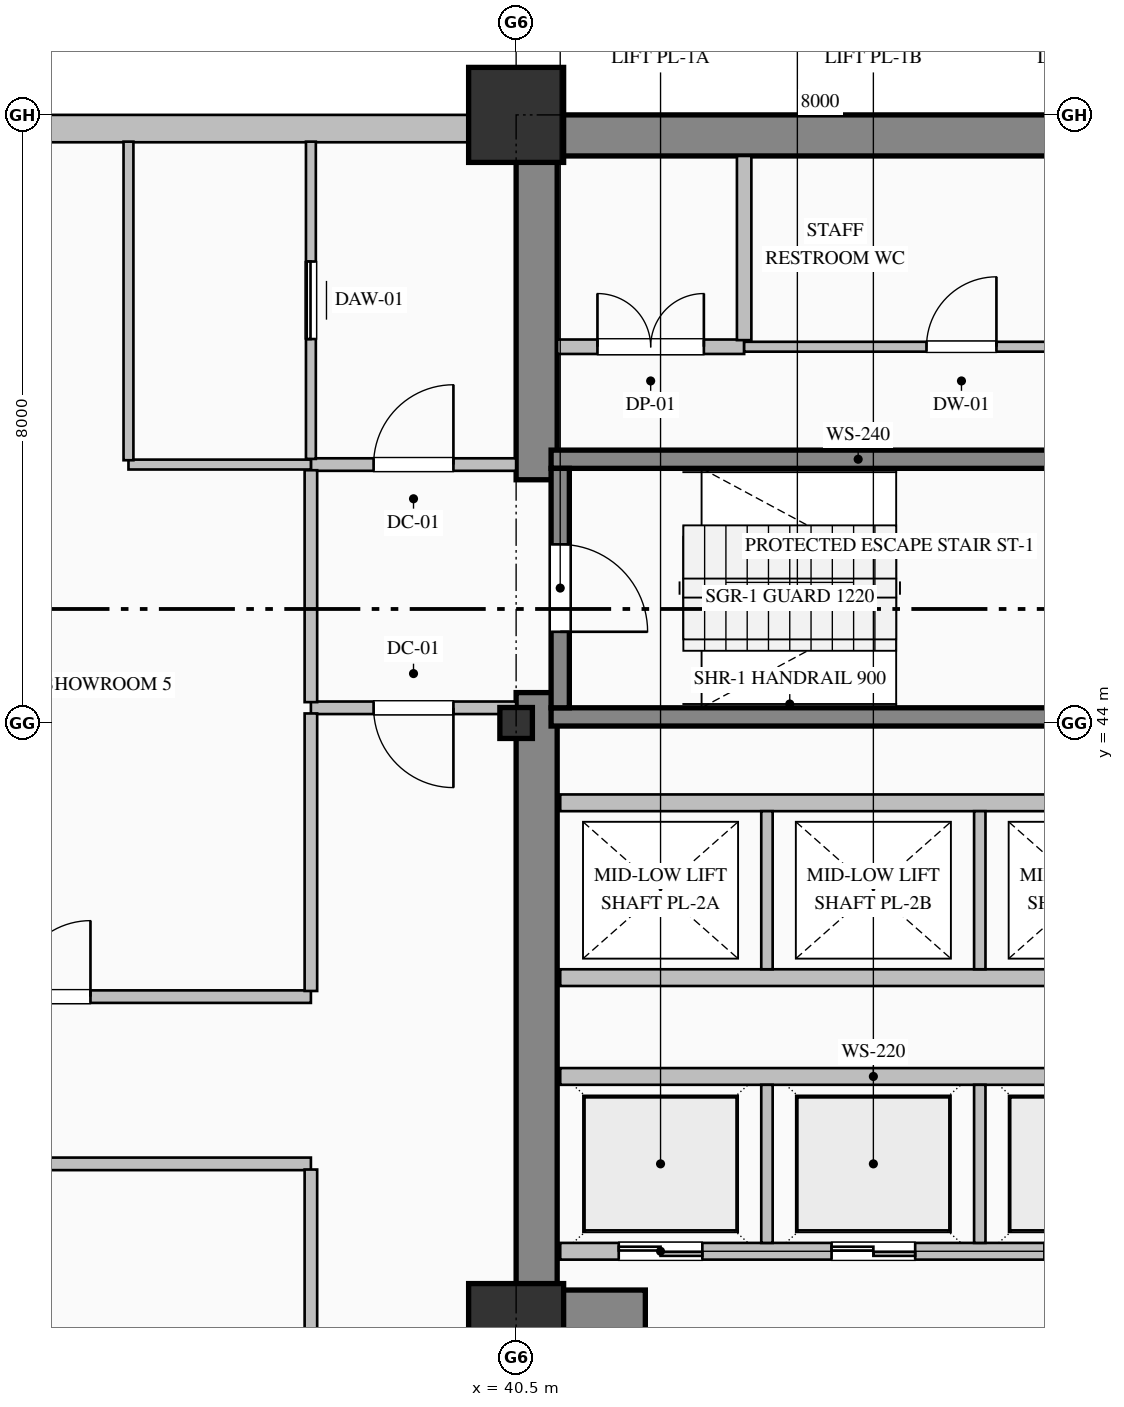
"""IFC4 building model, lengths in metres.
Left out: names, types, materials, properties, quantities, classifications, styles, units other than length and angle.
Written with IfcOpenShell. Run it as: python <this file> out.ifc"""

import sys

from ifc_helpers import new_model, si_unit, direction, frame, frame_2d, origin, origin_2d, place, context, subcontext, project, spatial, rectangle, hollow_rectangle, i_section, extrude, element, fill, save


model = new_model("IFC4")
c1 = context("Model", 3, precision=1e-05, world=origin(), true_north=direction((0.0, 1.0)))
c2 = subcontext(c1, "Body", "Model", "MODEL_VIEW")
j1 = project(units=[si_unit("LENGTHUNIT", "METRE"), si_unit("PLANEANGLEUNIT", "RADIAN")], contexts=[c1])
p1 = place(None, origin())
s1 = spatial("IfcSite", under=j1, at=p1, CompositionType="ELEMENT")
p2 = place(p1, origin())
s2 = spatial("IfcBuilding", under=s1, at=p2, CompositionType="ELEMENT")
p3 = place(p2, frame((0.0, 0.0, 96.2)))
s3 = spatial("IfcBuildingStorey", under=s2, at=p3, CompositionType="ELEMENT", Elevation=96.2)
p4 = place(p3, frame((40.5, 51.73, 0.0), z_axis=(0.0, 0.0, 1.0), x_axis=(1.0, 0.0, 0.0)))
e1 = element("IfcWall", 1, at=p4, inside=s3, PredefinedType="SHEAR", context=c2, shape_type="SweptSolid", body=[
    extrude(rectangle(XDim=23.5, YDim=0.54, at=frame_2d((11.75, 0.0))), origin(), (0.0, 0.0, 1.0), 3.75),
])
p5 = place(p3, frame((40.77, 36.54, 0.0), z_axis=(0.0, 0.0, 1.0), x_axis=(0.0, 1.0, 0.0)))
e2 = element("IfcWall", 2, at=p5, inside=s3, PredefinedType="SHEAR", context=c2, shape_type="SweptSolid", body=[
    extrude(rectangle(XDim=7.86, YDim=0.54, at=frame_2d((3.93, 0.0))), origin(), (0.0, 0.0, 1.0), 3.75),
])
p6 = place(p3, frame((40.77, 47.2, 0.0), z_axis=(0.0, 0.0, 1.0), x_axis=(0.0, 1.0, 0.0)))
e3 = element("IfcWall", 3, at=p6, inside=s3, PredefinedType="SHEAR", context=c2, shape_type="SweptSolid", body=[
    extrude(rectangle(XDim=4.26, YDim=0.54, at=frame_2d((2.13, 0.0))), origin(), (0.0, 0.0, 1.0), 3.75),
])
p7 = place(p3, frame((40.5, 36.27, 0.0), z_axis=(0.0, 0.0, 1.0), x_axis=(1.0, 0.0, 0.0)))
e4 = element("IfcWall", 4, at=p7, inside=s3, PredefinedType="SHEAR", context=c2, shape_type="SweptSolid", body=[
    extrude(rectangle(XDim=1.7, YDim=0.54, at=frame_2d((0.85, 0.0))), origin(), (0.0, 0.0, 1.0), 3.75),
])
p8 = place(p3, frame((40.5, 36.0, 0.0), z_axis=(0.0, 0.0, 1.0), x_axis=(1.0, 0.0, 0.0)))
e5 = element("IfcColumn", 5, at=p8, inside=s3, PredefinedType="COLUMN", context=c2, shape_type="SweptSolid", body=[
    extrude(hollow_rectangle(XDim=1.25, YDim=1.25, WallThickness=0.045, at=origin_2d()), origin(), (0.0, 0.0, 1.0), 4.0),
])
p9 = place(p3, frame((40.5, 44.0, 0.0), z_axis=(0.0, 0.0, 1.0), x_axis=(1.0, 0.0, 0.0)))
e6 = element("IfcColumn", 6, at=p9, inside=s3, PredefinedType="COLUMN", context=c2, shape_type="SweptSolid", body=[
    extrude(i_section(OverallWidth=0.407, OverallDepth=0.428, WebThickness=0.02, FlangeThickness=0.035, FilletRadius=0.022, at=origin_2d()), origin(), (0.0, 0.0, 1.0), 4.0),
])
p10 = place(p3, frame((40.5, 52.0, 0.0), z_axis=(0.0, 0.0, 1.0), x_axis=(1.0, 0.0, 0.0)))
e7 = element("IfcColumn", 7, at=p10, inside=s3, PredefinedType="COLUMN", context=c2, shape_type="SweptSolid", body=[
    extrude(hollow_rectangle(XDim=1.25, YDim=1.25, WallThickness=0.045, at=origin_2d()), origin(), (0.0, 0.0, 1.0), 4.0),
])
p11 = place(p3, frame((4.0, 51.82, 0.0), z_axis=(0.0, 0.0, 1.0), x_axis=(1.0, 0.0, 0.0)))
e8 = element("IfcWall", 8, at=p11, inside=s3, PredefinedType="SOLIDWALL", context=c2, shape_type="SweptSolid", body=[
    extrude(rectangle(XDim=36.52, YDim=0.36, at=frame_2d((18.26, 0.0))), origin(), (0.0, 0.0, 1.0), 3.25),
])
p12 = place(p11, frame((16.8, 0.0, 0.8)))
e9 = element("IfcOpeningElement", 9, at=p12, cuts=e8, PredefinedType="OPENING", context=c2, shape_type="SweptSolid", body=[
    extrude(rectangle(XDim=2.4, YDim=2.15, at=frame_2d((1.2, 1.075))), frame((0.0, 0.19, 0.0), z_axis=(0.0, -1.0, 0.0), x_axis=(1.0, 0.0, 0.0)), (0.0, 0.0, 1.0), 0.38),
])
p13 = place(p11, frame((24.15, 0.0, 0.85)))
e10 = element("IfcOpeningElement", 10, at=p13, cuts=e8, PredefinedType="OPENING", context=c2, shape_type="SweptSolid", body=[
    extrude(rectangle(XDim=2.1, YDim=2.05, at=frame_2d((1.05, 1.025))), frame((0.0, 0.19, 0.0), z_axis=(0.0, -1.0, 0.0), x_axis=(1.0, 0.0, 0.0)), (0.0, 0.0, 1.0), 0.38),
])
for number, where, z_axis, x_axis in (
    (11, (40.96, 47.47, 0.0), (0.0, 0.0, 1.0), (1.0, 0.0, 0.0)),
    (12, (49.04, 44.08, 0.0), (0.0, 0.0, 1.0), (-1.0, 0.0, 0.0)),
):
    element("IfcWall", number, at=place(p3, frame(where, z_axis=z_axis, x_axis=x_axis)), inside=s3, PredefinedType="SOLIDWALL", context=c2, shape_type="SweptSolid", body=[
        extrude(rectangle(XDim=8.08, YDim=0.24, at=frame_2d((4.04, 0.0))), origin(), (0.0, 0.0, 1.0), 4.0),
    ])
p14 = place(p3, frame((41.08, 47.35, 0.0), z_axis=(0.0, 0.0, 1.0), x_axis=(0.0, -1.0, 0.0)))
e13 = element("IfcWall", 13, at=p14, inside=s3, PredefinedType="SOLIDWALL", context=c2, shape_type="SweptSolid", body=[
    extrude(rectangle(XDim=3.15, YDim=0.24, at=frame_2d((1.575, 0.0))), origin(), (0.0, 0.0, 1.0), 4.0),
])
p15 = place(p14, frame((1.0, 0.0, 0.0)))
e14 = element("IfcOpeningElement", 14, at=p15, cuts=e13, PredefinedType="OPENING", context=c2, shape_type="SweptSolid", body=[
    extrude(rectangle(XDim=1.15, YDim=2.2, at=frame_2d((0.575, 1.1))), frame((0.0, 0.13, 0.0), z_axis=(0.0, -1.0, 0.0), x_axis=(1.0, 0.0, 0.0)), (0.0, 0.0, 1.0), 0.26),
])
p16 = place(p3, frame((49.32, 37.05, 0.0), z_axis=(0.0, 0.0, 1.0), x_axis=(-1.0, 0.0, 0.0)))
e15 = element("IfcWall", 15, at=p16, inside=s3, PredefinedType="PARTITIONING", context=c2, shape_type="SweptSolid", body=[
    extrude(rectangle(XDim=8.24, YDim=0.22, at=frame_2d((4.12, 0.0))), origin(), (0.0, 0.0, 1.0), 3.75),
])
p17 = place(p16, frame((6.37, 0.0, 0.0)))
e16 = element("IfcOpeningElement", 16, at=p17, cuts=e15, PredefinedType="OPENING", context=c2, shape_type="SweptSolid", body=[
    extrude(rectangle(XDim=1.1, YDim=2.2, at=frame_2d((0.55, 1.1))), frame((0.0, 0.12, 0.0), z_axis=(0.0, -1.0, 0.0), x_axis=(1.0, 0.0, 0.0)), (0.0, 0.0, 1.0), 0.24),
])
p18 = place(p16, frame((3.57, 0.0, 0.0)))
e17 = element("IfcOpeningElement", 17, at=p18, cuts=e15, PredefinedType="OPENING", context=c2, shape_type="SweptSolid", body=[
    extrude(rectangle(XDim=1.1, YDim=2.2, at=frame_2d((0.55, 1.1))), frame((0.0, 0.12, 0.0), z_axis=(0.0, -1.0, 0.0), x_axis=(1.0, 0.0, 0.0)), (0.0, 0.0, 1.0), 0.24),
])
p19 = place(p16, frame((0.77, 0.0, 0.0)))
e18 = element("IfcOpeningElement", 18, at=p19, cuts=e15, PredefinedType="OPENING", context=c2, shape_type="SweptSolid", body=[
    extrude(rectangle(XDim=1.1, YDim=2.2, at=frame_2d((0.55, 1.1))), frame((0.0, 0.12, 0.0), z_axis=(0.0, -1.0, 0.0), x_axis=(1.0, 0.0, 0.0)), (0.0, 0.0, 1.0), 0.24),
])
p20 = place(p3, frame((41.08, 39.35, 0.0), z_axis=(0.0, 0.0, 1.0), x_axis=(1.0, 0.0, 0.0)))
e19 = element("IfcWall", 19, at=p20, inside=s3, PredefinedType="PARTITIONING", context=c2, shape_type="SweptSolid", body=[
    extrude(rectangle(XDim=8.24, YDim=0.22, at=frame_2d((4.12, 0.0))), origin(), (0.0, 0.0, 1.0), 3.75),
])
for number, where, z_axis, x_axis in (
    (20, (43.8, 37.16, 0.0), (0.0, 0.0, 1.0), (0.0, 1.0, 0.0)),
    (21, (46.6, 37.16, 0.0), (0.0, 0.0, 1.0), (0.0, 1.0, 0.0)),
):
    element("IfcWall", number, at=place(p3, frame(where, z_axis=z_axis, x_axis=x_axis)), inside=s3, PredefinedType="PARTITIONING", context=c2, shape_type="SweptSolid", body=[
        extrude(rectangle(XDim=2.08, YDim=0.15, at=frame_2d((1.04, 0.0))), origin(), (0.0, 0.0, 1.0), 3.75),
    ])
for number, where, z_axis, x_axis in (
    (22, (49.32, 40.65, 0.0), (0.0, 0.0, 1.0), (-1.0, 0.0, 0.0)),
    (23, (41.08, 42.95, 0.0), (0.0, 0.0, 1.0), (1.0, 0.0, 0.0)),
):
    element("IfcWall", number, at=place(p3, frame(where, z_axis=z_axis, x_axis=x_axis)), inside=s3, PredefinedType="PARTITIONING", context=c2, shape_type="SweptSolid", body=[
        extrude(rectangle(XDim=8.24, YDim=0.22, at=frame_2d((4.12, 0.0))), origin(), (0.0, 0.0, 1.0), 3.75),
    ])
for number, where, z_axis, x_axis in (
    (24, (43.8, 40.76, 0.0), (0.0, 0.0, 1.0), (0.0, 1.0, 0.0)),
    (25, (46.6, 40.76, 0.0), (0.0, 0.0, 1.0), (0.0, 1.0, 0.0)),
):
    element("IfcWall", number, at=place(p3, frame(where, z_axis=z_axis, x_axis=x_axis)), inside=s3, PredefinedType="PARTITIONING", context=c2, shape_type="SweptSolid", body=[
        extrude(rectangle(XDim=2.08, YDim=0.15, at=frame_2d((1.04, 0.0))), origin(), (0.0, 0.0, 1.0), 3.75),
    ])
p21 = place(p3, frame((37.8, 47.4, 0.0), z_axis=(0.0, 0.0, 1.0), x_axis=(1.0, 0.0, 0.0)))
e26 = element("IfcWall", 26, at=p21, inside=s3, PredefinedType="PARTITIONING", context=c2, shape_type="SweptSolid", body=[
    extrude(rectangle(XDim=2.7, YDim=0.165, at=frame_2d((1.35, 0.0))), origin(), (0.0, 0.0, 1.0), 3.75),
])
p22 = place(p21, frame((0.825, 0.0, 0.0)))
e27 = element("IfcOpeningElement", 27, at=p22, cuts=e26, PredefinedType="OPENING", context=c2, shape_type="SweptSolid", body=[
    extrude(rectangle(XDim=1.05, YDim=2.15, at=frame_2d((0.525, 1.075))), frame((0.0, 0.093, 0.0), z_axis=(0.0, -1.0, 0.0), x_axis=(1.0, 0.0, 0.0)), (0.0, 0.0, 1.0), 0.185),
])
p23 = place(p3, frame((40.5, 44.2, 0.0), z_axis=(0.0, 0.0, 1.0), x_axis=(-1.0, 0.0, 0.0)))
e28 = element("IfcWall", 28, at=p23, inside=s3, PredefinedType="PARTITIONING", context=c2, shape_type="SweptSolid", body=[
    extrude(rectangle(XDim=2.7, YDim=0.165, at=frame_2d((1.35, 0.0))), origin(), (0.0, 0.0, 1.0), 3.75),
])
p24 = place(p23, frame((0.825, 0.0, 0.0)))
e29 = element("IfcOpeningElement", 29, at=p24, cuts=e28, PredefinedType="OPENING", context=c2, shape_type="SweptSolid", body=[
    extrude(rectangle(XDim=1.05, YDim=2.15, at=frame_2d((0.525, 1.075))), frame((0.0, 0.093, 0.0), z_axis=(0.0, -1.0, 0.0), x_axis=(1.0, 0.0, 0.0)), (0.0, 0.0, 1.0), 0.185),
])
p25 = place(p3, frame((37.8, 44.274, 0.0), z_axis=(0.0, 0.0, 1.0), x_axis=(0.0, 1.0, 0.0)))
e30 = element("IfcWall", 30, at=p25, inside=s3, PredefinedType="PARTITIONING", context=c2, shape_type="SweptSolid", body=[
    extrude(rectangle(XDim=3.051, YDim=0.165, at=frame_2d((1.525, 0.0))), origin(), (0.0, 0.0, 1.0), 3.75),
])
p26 = place(p3, frame((37.8, 47.475, 0.0), z_axis=(0.0, 0.0, 1.0), x_axis=(0.0, 1.0, 0.0)))
e31 = element("IfcWall", 31, at=p26, inside=s3, PredefinedType="PARTITIONING", context=c2, shape_type="SweptSolid", body=[
    extrude(rectangle(XDim=4.173, YDim=0.13, at=frame_2d((2.087, 0.0))), origin(), (0.0, 0.0, 1.0), 3.75),
])
p27 = place(p26, frame((1.577, 0.0, 0.0)))
e32 = element("IfcOpeningElement", 32, at=p27, cuts=e31, PredefinedType="OPENING", context=c2, shape_type="SweptSolid", body=[
    extrude(rectangle(XDim=1.02, YDim=2.15, at=frame_2d((0.51, 1.075))), frame((0.0, 0.075, 0.0), z_axis=(0.0, -1.0, 0.0), x_axis=(1.0, 0.0, 0.0)), (0.0, 0.0, 1.0), 0.15),
])
p28 = place(p3, frame((37.8, 47.4, 0.0), z_axis=(0.0, 0.0, 1.0), x_axis=(-1.0, 0.0, 0.0)))
e33 = element("IfcWall", 33, at=p28, inside=s3, PredefinedType="PARTITIONING", context=c2, shape_type="SweptSolid", body=[
    extrude(rectangle(XDim=2.4, YDim=0.13, at=frame_2d((1.2, 0.0))), origin(), (0.0, 0.0, 1.0), 3.75),
])
p29 = place(p3, frame((35.4, 47.457, 0.0), z_axis=(0.0, 0.0, 1.0), x_axis=(0.0, 1.0, 0.0)))
e34 = element("IfcWall", 34, at=p29, inside=s3, PredefinedType="PARTITIONING", context=c2, shape_type="SweptSolid", body=[
    extrude(rectangle(XDim=4.191, YDim=0.13, at=frame_2d((2.095, 0.0))), origin(), (0.0, 0.0, 1.0), 3.75),
])
p30 = place(p3, frame((41.04, 48.95, 0.0), z_axis=(0.0, 0.0, 1.0), x_axis=(1.0, 0.0, 0.0)))
e35 = element("IfcWall", 35, at=p30, inside=s3, PredefinedType="PARTITIONING", context=c2, shape_type="SweptSolid", body=[
    extrude(rectangle(XDim=2.46, YDim=0.19, at=frame_2d((1.23, 0.0))), origin(), (0.0, 0.0, 1.0), 3.75),
])
p31 = place(p30, frame((0.53, 0.0, 0.0)))
e36 = element("IfcOpeningElement", 36, at=p31, cuts=e35, PredefinedType="OPENING", context=c2, shape_type="SweptSolid", body=[
    extrude(rectangle(XDim=1.4, YDim=2.25, at=frame_2d((0.7, 1.125))), frame((0.0, 0.105, 0.0), z_axis=(0.0, -1.0, 0.0), x_axis=(1.0, 0.0, 0.0)), (0.0, 0.0, 1.0), 0.21),
])
p32 = place(p3, frame((43.5, 48.95, 0.0), z_axis=(0.0, 0.0, 1.0), x_axis=(1.0, 0.0, 0.0)))
e37 = element("IfcWall", 37, at=p32, inside=s3, PredefinedType="PARTITIONING", context=c2, shape_type="SweptSolid", body=[
    extrude(rectangle(XDim=5.718, YDim=0.13, at=frame_2d((2.859, 0.0))), origin(), (0.0, 0.0, 1.0), 3.75),
])
p33 = place(p32, frame((2.399, 0.0, 0.0)))
e38 = element("IfcOpeningElement", 38, at=p33, cuts=e37, PredefinedType="OPENING", context=c2, shape_type="SweptSolid", body=[
    extrude(rectangle(XDim=0.92, YDim=2.15, at=frame_2d((0.46, 1.075))), frame((0.0, 0.075, 0.0), z_axis=(0.0, -1.0, 0.0), x_axis=(1.0, 0.0, 0.0)), (0.0, 0.0, 1.0), 0.15),
])
p34 = place(p3, frame((43.5, 51.46, 0.0), z_axis=(0.0, 0.0, 1.0), x_axis=(0.0, -1.0, 0.0)))
e39 = element("IfcWall", 39, at=p34, inside=s3, PredefinedType="PARTITIONING", context=c2, shape_type="SweptSolid", body=[
    extrude(rectangle(XDim=2.423, YDim=0.19, at=frame_2d((1.211, 0.0))), origin(), (0.0, 0.0, 1.0), 3.75),
])
p35 = place(p3, frame((31.0, 40.4, 0.0), z_axis=(0.0, 0.0, 1.0), x_axis=(1.0, 0.0, 0.0)))
e40 = element("IfcWall", 40, at=p35, inside=s3, PredefinedType="PARTITIONING", context=c2, shape_type="SweptSolid", body=[
    extrude(rectangle(XDim=6.8, YDim=0.165, at=frame_2d((3.4, 0.0))), origin(), (0.0, 0.0, 1.0), 3.75),
])
p36 = place(p35, frame((2.9, 0.0, 0.0)))
e41 = element("IfcOpeningElement", 41, at=p36, cuts=e40, PredefinedType="OPENING", context=c2, shape_type="SweptSolid", body=[
    extrude(rectangle(XDim=1.0, YDim=2.15, at=frame_2d((0.5, 1.075))), frame((0.0, 0.093, 0.0), z_axis=(0.0, -1.0, 0.0), x_axis=(1.0, 0.0, 0.0)), (0.0, 0.0, 1.0), 0.185),
])
p37 = place(p3, frame((37.8, 38.2, 0.0), z_axis=(0.0, 0.0, 1.0), x_axis=(-1.0, 0.0, 0.0)))
e42 = element("IfcWall", 42, at=p37, inside=s3, PredefinedType="PARTITIONING", context=c2, shape_type="SweptSolid", body=[
    extrude(rectangle(XDim=4.0, YDim=0.165, at=frame_2d((2.0, 0.0))), origin(), (0.0, 0.0, 1.0), 3.75),
])
p38 = place(p3, frame((37.8, 40.475, 0.0), z_axis=(0.0, 0.0, 1.0), x_axis=(0.0, 1.0, 0.0)))
e43 = element("IfcWall", 43, at=p38, inside=s3, PredefinedType="PARTITIONING", context=c2, shape_type="SweptSolid", body=[
    extrude(rectangle(XDim=3.651, YDim=0.165, at=frame_2d((1.825, 0.0))), origin(), (0.0, 0.0, 1.0), 3.75),
])
p39 = place(p3, frame((37.8, 31.6, 0.0), z_axis=(0.0, 0.0, 1.0), x_axis=(0.0, 1.0, 0.0)))
e44 = element("IfcWall", 44, at=p39, inside=s3, PredefinedType="PARTITIONING", context=c2, shape_type="SweptSolid", body=[
    extrude(rectangle(XDim=6.525, YDim=0.165, at=frame_2d((3.263, 0.0))), origin(), (0.0, 0.0, 1.0), 3.75),
])
p40 = place(p39, frame((2.763, 0.0, 0.0)))
e45 = element("IfcOpeningElement", 45, at=p40, cuts=e44, PredefinedType="OPENING", context=c2, shape_type="SweptSolid", body=[
    extrude(rectangle(XDim=1.0, YDim=2.15, at=frame_2d((0.5, 1.075))), frame((0.0, 0.093, 0.0), z_axis=(0.0, -1.0, 0.0), x_axis=(1.0, 0.0, 0.0)), (0.0, 0.0, 1.0), 0.185),
])
p41 = place(p15, origin())
e46 = element("IfcDoor", 46, at=p41, inside=s3, OperationType="SINGLE_SWING_RIGHT", PredefinedType="DOOR", context=c2, shape_type="SweptSolid", body=[
    extrude(rectangle(XDim=1.15, YDim=2.2, at=frame_2d((0.575, 1.1))), frame((0.0, 0.025, 0.0), z_axis=(0.0, -1.0, 0.0), x_axis=(1.0, 0.0, 0.0)), (0.0, 0.0, 1.0), 0.05),
])
fill(e14, e46)
p42 = place(p17, origin())
e47 = element("IfcDoor", 47, at=p42, inside=s3, OperationType="DOUBLE_DOOR_SLIDING", PredefinedType="DOOR", context=c2, shape_type="SweptSolid", body=[
    extrude(rectangle(XDim=1.1, YDim=2.2, at=frame_2d((0.55, 1.1))), frame((0.0, 0.025, 0.0), z_axis=(0.0, -1.0, 0.0), x_axis=(1.0, 0.0, 0.0)), (0.0, 0.0, 1.0), 0.05),
])
fill(e16, e47)
p43 = place(p18, origin())
e48 = element("IfcDoor", 48, at=p43, inside=s3, OperationType="DOUBLE_DOOR_SLIDING", PredefinedType="DOOR", context=c2, shape_type="SweptSolid", body=[
    extrude(rectangle(XDim=1.1, YDim=2.2, at=frame_2d((0.55, 1.1))), frame((0.0, 0.025, 0.0), z_axis=(0.0, -1.0, 0.0), x_axis=(1.0, 0.0, 0.0)), (0.0, 0.0, 1.0), 0.05),
])
fill(e17, e48)
p44 = place(p22, origin())
e49 = element("IfcDoor", 49, at=p44, inside=s3, OperationType="SINGLE_SWING_RIGHT", PredefinedType="DOOR", context=c2, shape_type="SweptSolid", body=[
    extrude(rectangle(XDim=1.05, YDim=2.15, at=frame_2d((0.525, 1.075))), frame((0.0, 0.025, 0.0), z_axis=(0.0, -1.0, 0.0), x_axis=(1.0, 0.0, 0.0)), (0.0, 0.0, 1.0), 0.05),
])
fill(e27, e49)
p45 = place(p24, origin())
e50 = element("IfcDoor", 50, at=p45, inside=s3, OperationType="SINGLE_SWING_LEFT", PredefinedType="DOOR", context=c2, shape_type="SweptSolid", body=[
    extrude(rectangle(XDim=1.05, YDim=2.15, at=frame_2d((0.525, 1.075))), frame((0.0, 0.025, 0.0), z_axis=(0.0, -1.0, 0.0), x_axis=(1.0, 0.0, 0.0)), (0.0, 0.0, 1.0), 0.05),
])
fill(e29, e50)
p46 = place(p27, origin())
e51 = element("IfcDoor", 51, at=p46, inside=s3, OperationType="SLIDING_TO_LEFT", PredefinedType="DOOR", context=c2, shape_type="SweptSolid", body=[
    extrude(rectangle(XDim=1.02, YDim=2.15, at=frame_2d((0.51, 1.075))), frame((0.0, 0.025, 0.0), z_axis=(0.0, -1.0, 0.0), x_axis=(1.0, 0.0, 0.0)), (0.0, 0.0, 1.0), 0.05),
])
fill(e32, e51)
p47 = place(p31, origin())
e52 = element("IfcDoor", 52, at=p47, inside=s3, OperationType="DOUBLE_DOOR_SINGLE_SWING", PredefinedType="DOOR", context=c2, shape_type="SweptSolid", body=[
    extrude(rectangle(XDim=1.4, YDim=2.25, at=frame_2d((0.7, 1.125))), frame((0.0, 0.025, 0.0), z_axis=(0.0, -1.0, 0.0), x_axis=(1.0, 0.0, 0.0)), (0.0, 0.0, 1.0), 0.05),
])
fill(e36, e52)
p48 = place(p33, origin())
e53 = element("IfcDoor", 53, at=p48, inside=s3, OperationType="SINGLE_SWING_RIGHT", PredefinedType="DOOR", context=c2, shape_type="SweptSolid", body=[
    extrude(rectangle(XDim=0.92, YDim=2.15, at=frame_2d((0.46, 1.075))), frame((0.0, 0.025, 0.0), z_axis=(0.0, -1.0, 0.0), x_axis=(1.0, 0.0, 0.0)), (0.0, 0.0, 1.0), 0.05),
])
fill(e38, e53)
p49 = place(p36, origin())
e54 = element("IfcDoor", 54, at=p49, inside=s3, OperationType="SINGLE_SWING_RIGHT", PredefinedType="DOOR", context=c2, shape_type="SweptSolid", body=[
    extrude(rectangle(XDim=1.0, YDim=2.15, at=frame_2d((0.5, 1.075))), frame((0.0, 0.025, 0.0), z_axis=(0.0, -1.0, 0.0), x_axis=(1.0, 0.0, 0.0)), (0.0, 0.0, 1.0), 0.05),
])
fill(e41, e54)
save(model, sys.argv[1])
